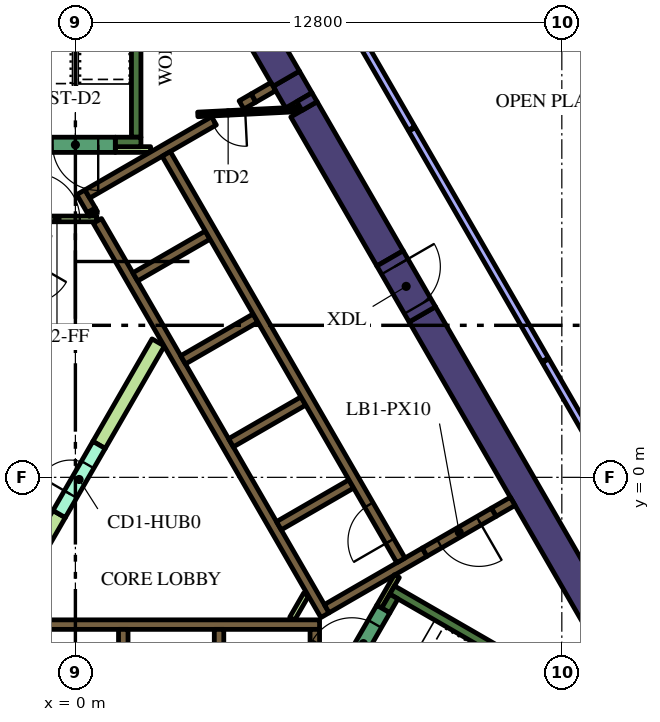
"""IFC4 building model, lengths in metres.
Left out: names, types, materials, properties, quantities, classifications, styles, units other than length and angle.
Written with IfcOpenShell. Run it as: python <this file> out.ifc"""

import sys

from ifc_helpers import new_model, si_unit, direction, frame, frame_2d, origin, place, context, subcontext, project, spatial, polyline, rectangle, outline, extrude, element, fill, save


model = new_model("IFC4")
c1 = context("Model", 3, precision=1e-05, world=origin(), true_north=direction((0.0, 1.0)))
c2 = subcontext(c1, "Body", "Model", "MODEL_VIEW")
j1 = project(units=[si_unit("LENGTHUNIT", "METRE"), si_unit("PLANEANGLEUNIT", "RADIAN")], contexts=[c1])
p1 = place(None, origin())
s1 = spatial("IfcSite", under=j1, at=p1, CompositionType="ELEMENT")
p2 = place(p1, origin())
s2 = spatial("IfcBuilding", under=s1, at=p2, CompositionType="ELEMENT")
p3 = place(p2, frame((0.0, 0.0, 179.4)))
s3 = spatial("IfcBuildingStorey", under=s2, at=p3, CompositionType="ELEMENT", Elevation=179.4)
p4 = place(p3, frame((9.129, 4.289, 0.0), z_axis=(0.0, 0.0, 1.0), x_axis=(0.499995742806, -0.866027861663, 0.0)))
e1 = element("IfcWall", 1, at=p4, inside=s3, PredefinedType="SOLIDWALL", context=c2, shape_type="SweptSolid", body=[
    extrude(rectangle(XDim=12.527, YDim=0.8, at=frame_2d((6.264, 0.0))), origin(), (0.0, 0.0, 1.0), 4.2),
])
p5 = place(p3, frame((5.878, 9.918, 0.0), z_axis=(0.0, 0.0, 1.0), x_axis=(-0.499893918903, 0.866086641072, 0.0)))
e2 = element("IfcWall", 2, at=p5, inside=s3, PredefinedType="SOLIDWALL", context=c2, shape_type="SweptSolid", body=[
    extrude(rectangle(XDim=0.657, YDim=0.8, at=frame_2d((0.329, 0.0))), origin(), (0.0, 0.0, 1.0), 4.2),
])
p6 = place(p3, frame((8.279, 5.761, 0.0), z_axis=(0.0, 0.0, 1.0), x_axis=(-0.500024261398, 0.866011396007, 0.0)))
e3 = element("IfcWall", 3, at=p6, inside=s3, PredefinedType="SOLIDWALL", context=c2, shape_type="SweptSolid", body=[
    extrude(rectangle(XDim=4.528, YDim=0.8, at=frame_2d((2.264, 0.0))), origin(), (0.0, 0.0, 1.0), 4.2),
])
p7 = place(p3, origin())
e4 = element("IfcWall", 4, at=p7, inside=s3, PredefinedType="SOLIDWALL", context=c2, shape_type="SweptSolid", body=[
    extrude(outline(polyline([(5.961, 9.654), (5.827, 9.886), (6.226, 10.116), (6.36, 9.884), (5.961, 9.654)])), origin(), (0.0, 0.0, 1.0), 4.2),
])
p8 = place(p3, frame((5.549, 10.489, 0.0), z_axis=(0.0, 0.0, 1.0), x_axis=(-0.50001746176, 0.866015321998, 0.0)))
e5 = element("IfcWall", 5, at=p8, inside=s3, PredefinedType="SOLIDWALL", context=c2, shape_type="SweptSolid", body=[
    extrude(rectangle(XDim=7.068, YDim=0.8, at=frame_2d((3.534, 0.0))), origin(), (0.0, 0.0, 1.0), 4.2),
])
p9 = place(p3, frame((8.334, -2.964, 0.0), z_axis=(0.0, 0.0, 1.0), x_axis=(0.866016039709, -0.500016218704, 0.0)))
e6 = element("IfcWall", 6, at=p9, inside=s3, PredefinedType="SOLIDWALL", context=c2, shape_type="SweptSolid", body=[
    extrude(rectangle(XDim=7.05, YDim=0.25, at=frame_2d((3.525, 0.0))), origin(), (0.0, 0.0, 1.0), 4.2),
])
p10 = place(p3, frame((8.168, -3.503, 0.0), z_axis=(0.0, 0.0, 1.0), x_axis=(0.49972245349, 0.866185586049, 0.0)))
e7 = element("IfcWall", 7, at=p10, inside=s3, PredefinedType="SOLIDWALL", context=c2, shape_type="SweptSolid", body=[
    extrude(rectangle(XDim=0.425, YDim=0.25, at=frame_2d((0.212, 0.0))), origin(), (0.0, 0.0, 1.0), 4.2),
])
p11 = place(p3, frame((1.6, 8.95, 0.0), z_axis=(0.0, 0.0, 1.0), x_axis=(0.0, 1.0, 0.0)))
e8 = element("IfcWall", 8, at=p11, inside=s3, PredefinedType="SOLIDWALL", context=c2, shape_type="SweptSolid", body=[
    extrude(rectangle(XDim=6.8, YDim=0.25, at=frame_2d((3.4, 0.0))), origin(), (0.0, 0.0, 1.0), 4.2),
])
p12 = place(p3, frame((1.05, 8.825, 0.0), z_axis=(0.0, 0.0, 1.0), x_axis=(1.0, 0.0, 0.0)))
e9 = element("IfcWall", 9, at=p12, inside=s3, PredefinedType="SOLIDWALL", context=c2, shape_type="SweptSolid", body=[
    extrude(rectangle(XDim=0.675, YDim=0.25, at=frame_2d((0.337, 0.0))), origin(), (0.0, 0.0, 1.0), 4.2),
])
p13 = place(p3, frame((-5.545, -3.875, 0.0), z_axis=(0.0, 0.0, 1.0), x_axis=(1.0, 0.0, 0.0)))
e10 = element("IfcWall", 10, at=p13, inside=s3, PredefinedType="SOLIDWALL", context=c2, shape_type="SweptSolid", body=[
    extrude(rectangle(XDim=11.97, YDim=0.25, at=frame_2d((5.985, 0.0))), origin(), (0.0, 0.0, 1.0), 4.2),
])
p14 = place(p3, frame((6.3, -7.24, 0.0), z_axis=(0.0, 0.0, 1.0), x_axis=(0.0, 1.0, 0.0)))
e11 = element("IfcWall", 11, at=p14, inside=s3, PredefinedType="SOLIDWALL", context=c2, shape_type="SweptSolid", body=[
    extrude(rectangle(XDim=3.24, YDim=0.25, at=frame_2d((1.62, 0.0))), origin(), (0.0, 0.0, 1.0), 4.2),
])
for number, where, z_axis, x_axis in (
    (12, (3.78, -4.0, 0.0), (0.0, 0.0, 1.0), (0.0, -1.0, 0.0)),
    (13, (1.26, -4.0, 0.0), (0.0, 0.0, 1.0), (0.0, -1.0, 0.0)),
):
    element("IfcWall", number, at=place(p3, frame(where, z_axis=z_axis, x_axis=x_axis)), inside=s3, PredefinedType="SOLIDWALL", context=c2, shape_type="SweptSolid", body=[
        extrude(rectangle(XDim=2.2, YDim=0.25, at=frame_2d((1.1, 0.0))), origin(), (0.0, 0.0, 1.0), 4.2),
    ])
p15 = place(p3, frame((11.507, -0.631, 0.0), z_axis=(0.0, 0.0, 1.0), x_axis=(-0.866093731455, -0.499881634324, 0.0)))
e14 = element("IfcWall", 14, at=p15, inside=s3, PredefinedType="SOLIDWALL", context=c2, shape_type="SweptSolid", body=[
    extrude(rectangle(XDim=0.575, YDim=0.25, at=frame_2d((0.288, 0.0))), origin(), (0.0, 0.0, 1.0), 4.2),
])
p16 = place(p3, frame((0.473, 6.93, 0.0), z_axis=(0.0, 0.0, 1.0), x_axis=(-0.49972245349, 0.866185586049, 0.0)))
e15 = element("IfcWall", 15, at=p16, inside=s3, PredefinedType="SOLIDWALL", context=c2, shape_type="SweptSolid", body=[
    extrude(rectangle(XDim=0.11, YDim=0.25, at=frame_2d((0.055, 0.0))), origin(), (0.0, 0.0, 1.0), 4.2),
])
p17 = place(p3, frame((6.568, -3.627, 0.0), z_axis=(0.0, 0.0, 1.0), x_axis=(-0.499999455981, 0.866025717874, 0.0)))
e16 = element("IfcWall", 16, at=p17, inside=s3, PredefinedType="SOLIDWALL", context=c2, shape_type="SweptSolid", body=[
    extrude(rectangle(XDim=11.978, YDim=0.25, at=frame_2d((5.989, 0.0))), origin(), (0.0, 0.0, 1.0), 4.2),
])
p18 = place(p3, frame((0.417, 7.027, 0.0), z_axis=(0.0, 0.0, 1.0), x_axis=(-0.500210807569, 0.865903659763, 0.0)))
e17 = element("IfcWall", 17, at=p18, inside=s3, PredefinedType="SOLIDWALL", context=c2, shape_type="SweptSolid", body=[
    extrude(rectangle(XDim=0.548, YDim=0.25, at=frame_2d((0.274, 0.0))), origin(), (0.0, 0.0, 1.0), 4.2),
])
p19 = place(p3, frame((3.647, 9.38, 0.0), z_axis=(0.0, 0.0, 1.0), x_axis=(-0.866025015791, -0.500000672024, 0.0)))
e18 = element("IfcWall", 18, at=p19, inside=s3, PredefinedType="SOLIDWALL", context=c2, shape_type="SweptSolid", body=[
    extrude(rectangle(XDim=3.849, YDim=0.25, at=frame_2d((1.924, 0.0))), origin(), (0.0, 0.0, 1.0), 4.2),
])
p20 = place(p3, frame((1.574, 5.274, 0.0), z_axis=(0.0, 0.0, 1.0), x_axis=(0.866028486751, 0.499994660107, 0.0)))
e19 = element("IfcWall", 19, at=p20, inside=s3, PredefinedType="SOLIDWALL", context=c2, shape_type="SweptSolid", body=[
    extrude(rectangle(XDim=2.2, YDim=0.25, at=frame_2d((1.1, 0.0))), origin(), (0.0, 0.0, 1.0), 4.2),
])
for number, where, z_axis, x_axis in (
    (20, (2.834, 3.091, 0.0), (0.0, 0.0, 1.0), (0.866, 0.5, 0.0)),
    (21, (4.094, 0.909, 0.0), (0.0, 0.0, 1.0), (0.866, 0.5, 0.0)),
    (22, (5.354, -1.274, 0.0), (0.0, 0.0, 1.0), (0.866, 0.5, 0.0)),
):
    element("IfcWall", number, at=place(p3, frame(where, z_axis=z_axis, x_axis=x_axis)), inside=s3, PredefinedType="SOLIDWALL", context=c2, shape_type="SweptSolid", body=[
        extrude(rectangle(XDim=2.2, YDim=0.25, at=frame_2d((1.1, 0.0))), origin(), (0.0, 0.0, 1.0), 4.2),
    ])
p21 = place(p3, frame((6.614, -3.456, 0.0), z_axis=(0.0, 0.0, 1.0), x_axis=(0.866032512851, 0.499987686533, 0.0)))
e23 = element("IfcWall", 23, at=p21, inside=s3, PredefinedType="SOLIDWALL", context=c2, shape_type="SweptSolid", body=[
    extrude(rectangle(XDim=2.975, YDim=0.25, at=frame_2d((1.487, 0.0))), origin(), (0.0, 0.0, 1.0), 4.2),
])
p22 = place(p3, frame((4.688, 9.981, 0.0), z_axis=(0.0, 0.0, 1.0), x_axis=(-0.865974312977, -0.500088481434, 0.0)))
e24 = element("IfcWall", 24, at=p22, inside=s3, PredefinedType="SOLIDWALL", context=c2, shape_type="SweptSolid", body=[
    extrude(rectangle(XDim=0.366, YDim=0.25, at=frame_2d((0.183, 0.0))), origin(), (0.0, 0.0, 1.0), 4.2),
])
p23 = place(p3, frame((4.689, 9.982, 0.0), z_axis=(0.0, 0.0, 1.0), x_axis=(0.865947592822, 0.500134748329, 0.0)))
e25 = element("IfcWall", 25, at=p23, inside=s3, PredefinedType="SOLIDWALL", context=c2, shape_type="SweptSolid", body=[
    extrude(rectangle(XDim=0.598, YDim=0.25, at=frame_2d((0.299, 0.0))), origin(), (0.0, 0.0, 1.0), 4.2),
])
p24 = place(p3, frame((1.05, 8.625, 0.0), z_axis=(0.0, 0.0, 1.0), x_axis=(1.0, 0.0, 0.0)))
e26 = element("IfcWall", 26, at=p24, inside=s3, PredefinedType="PARTITIONING", context=c2, shape_type="SweptSolid", body=[
    extrude(rectangle(XDim=0.929, YDim=0.15, at=frame_2d((0.464, 0.0))), origin(), (0.0, 0.0, 1.0), 3.15),
])
p25 = place(p3, frame((8.459, -2.599, 0.0), z_axis=(0.0, 0.0, 1.0), x_axis=(-0.500041054325, -0.866001699761, 0.0)))
e27 = element("IfcWall", 27, at=p25, inside=s3, PredefinedType="PARTITIONING", context=c2, shape_type="SweptSolid", body=[
    extrude(rectangle(XDim=0.929, YDim=0.15, at=frame_2d((0.464, 0.0))), origin(), (0.0, 0.0, 1.0), 4.2),
])
p26 = place(p3, frame((5.705, -3.718, 0.0), z_axis=(0.0, 0.0, 1.0), x_axis=(0.499962090823, 0.866047289552, 0.0)))
e28 = element("IfcWall", 28, at=p26, inside=s3, PredefinedType="PARTITIONING", context=c2, shape_type="SweptSolid", body=[
    extrude(rectangle(XDim=0.735, YDim=0.15, at=frame_2d((0.367, 0.0))), origin(), (0.0, 0.0, 1.0), 3.15),
])
e29 = element("IfcWall", 29, at=p7, inside=s3, PredefinedType="PARTITIONING", context=c2, shape_type="SweptSolid", body=[
    extrude(outline(polyline([(2.017, 3.643), (2.342, 3.456), (0.785, 0.76), (0.46, 0.947), (2.017, 3.643)])), origin(), (0.0, 0.0, 1.0), 3.15),
])
e30 = element("IfcWall", 30, at=p7, inside=s3, PredefinedType="PARTITIONING", context=c2, shape_type="SweptSolid", body=[
    extrude(outline(polyline([(-0.59, -0.872), (-0.265, -1.059), (-1.822, -3.756), (-2.147, -3.568), (-0.59, -0.872)])), origin(), (0.0, 0.0, 1.0), 3.15),
])
p27 = place(p3, frame((8.565, -2.185, 0.0), z_axis=(0.0, 0.0, 1.0), x_axis=(-0.499997954832, 0.866026584559, 0.0)))
e31 = element("IfcWall", 31, at=p27, inside=s3, PredefinedType="SOLIDWALL", context=c2, shape_type="SweptSolid", body=[
    extrude(rectangle(XDim=12.35, YDim=0.25, at=frame_2d((6.175, 0.0))), origin(), (0.0, 0.0, 1.0), 4.2),
])
p28 = place(p27, frame((0.585, 0.0, 0.0)))
e32 = element("IfcOpeningElement", 32, at=p28, cuts=e31, PredefinedType="OPENING", context=c2, shape_type="SweptSolid", body=[
    extrude(rectangle(XDim=1.1, YDim=2.1, at=frame_2d((0.55, 1.05))), frame((0.0, 0.135, 0.0), z_axis=(0.0, -1.0, 0.0), x_axis=(1.0, 0.0, 0.0)), (0.0, 0.0, 1.0), 0.27),
])
p29 = place(p3, frame((7.053, -5.284, 0.0), z_axis=(0.0, 0.0, 1.0), x_axis=(0.500078061341, 0.865980330357, 0.0)))
e33 = element("IfcWall", 33, at=p29, inside=s3, PredefinedType="SOLIDWALL", context=c2, shape_type="SweptSolid", body=[
    extrude(rectangle(XDim=2.1, YDim=0.4, at=frame_2d((1.05, 0.0))), origin(), (0.0, 0.0, 1.0), 4.2),
])
p30 = place(p29, frame((0.45, 0.0, 0.0)))
e34 = element("IfcOpeningElement", 34, at=p30, cuts=e33, PredefinedType="OPENING", context=c2, shape_type="SweptSolid", body=[
    extrude(rectangle(XDim=1.2, YDim=2.1, at=frame_2d((0.6, 1.05))), frame((0.0, 0.21, 0.0), z_axis=(0.0, -1.0, 0.0), x_axis=(1.0, 0.0, 0.0)), (0.0, 0.0, 1.0), 0.42),
])
p31 = place(p3, frame((1.05, 8.75, 0.0), z_axis=(0.0, 0.0, 1.0), x_axis=(-1.0, 0.0, 0.0)))
e35 = element("IfcWall", 35, at=p31, inside=s3, PredefinedType="SOLIDWALL", context=c2, shape_type="SweptSolid", body=[
    extrude(rectangle(XDim=2.1, YDim=0.4, at=frame_2d((1.05, 0.0))), origin(), (0.0, 0.0, 1.0), 4.2),
])
p32 = place(p31, frame((0.45, 0.0, 0.0)))
e36 = element("IfcOpeningElement", 36, at=p32, cuts=e35, PredefinedType="OPENING", context=c2, shape_type="SweptSolid", body=[
    extrude(rectangle(XDim=1.2, YDim=2.1, at=frame_2d((0.6, 1.05))), frame((0.0, 0.21, 0.0), z_axis=(0.0, -1.0, 0.0), x_axis=(1.0, 0.0, 0.0)), (0.0, 0.0, 1.0), 0.42),
])
p33 = place(p3, frame((5.917, 9.684, 0.0), z_axis=(0.0, 0.0, 1.0), x_axis=(-0.998758194515, -0.049820366212, 0.0)))
e37 = element("IfcWall", 37, at=p33, inside=s3, PredefinedType="PARTITIONING", context=c2, shape_type="SweptSolid", body=[
    extrude(rectangle(XDim=2.7, YDim=0.12, at=frame_2d((1.35, 0.0))), origin(), (0.0, 0.0, 1.0), 3.15),
])
p34 = place(p33, frame((1.45, 0.0, 0.0)))
e38 = element("IfcOpeningElement", 38, at=p34, cuts=e37, PredefinedType="OPENING", context=c2, shape_type="SweptSolid", body=[
    extrude(rectangle(XDim=0.9, YDim=2.1, at=frame_2d((0.45, 1.05))), frame((0.0, 0.07, 0.0), z_axis=(0.0, -1.0, 0.0), x_axis=(1.0, 0.0, 0.0)), (0.0, 0.0, 1.0), 0.14),
])
p35 = place(p3, frame((-0.427, -0.966, 0.0), z_axis=(0.0, 0.0, 1.0), x_axis=(0.49994051562, 0.866059744384, 0.0)))
e39 = element("IfcWall", 39, at=p35, inside=s3, PredefinedType="PARTITIONING", context=c2, shape_type="SweptSolid", body=[
    extrude(rectangle(XDim=2.1, YDim=0.375, at=frame_2d((1.05, 0.0))), origin(), (0.0, 0.0, 1.0), 3.15),
])
p36 = place(p35, frame((0.6, 0.0, 0.0)))
e40 = element("IfcOpeningElement", 40, at=p36, cuts=e39, PredefinedType="OPENING", context=c2, shape_type="SweptSolid", body=[
    extrude(rectangle(XDim=0.9, YDim=2.1, at=frame_2d((0.45, 1.05))), frame((0.0, 0.198, 0.0), z_axis=(0.0, -1.0, 0.0), x_axis=(1.0, 0.0, 0.0)), (0.0, 0.0, 1.0), 0.395),
])
p37 = place(p3, frame((-1.534, 6.8, 0.0), z_axis=(0.0, 0.0, 1.0), x_axis=(1.0, 0.0, 0.0)))
e41 = element("IfcWall", 41, at=p37, inside=s3, PredefinedType="PARTITIONING", context=c2, shape_type="SweptSolid", body=[
    extrude(rectangle(XDim=2.1, YDim=0.15, at=frame_2d((1.05, 0.0))), origin(), (0.0, 0.0, 1.0), 3.15),
])
p38 = place(p37, frame((0.45, 0.0, 0.0)))
e42 = element("IfcOpeningElement", 42, at=p38, cuts=e41, PredefinedType="OPENING", context=c2, shape_type="SweptSolid", body=[
    extrude(rectangle(XDim=1.2, YDim=2.1, at=frame_2d((0.6, 1.05))), frame((0.0, 0.085, 0.0), z_axis=(0.0, -1.0, 0.0), x_axis=(1.0, 0.0, 0.0)), (0.0, 0.0, 1.0), 0.17),
])
p39 = place(p3, frame((11.009, -0.919, 0.0), z_axis=(0.0, 0.0, 1.0), x_axis=(-0.866059744384, -0.49994051562, 0.0)))
e43 = element("IfcWall", 43, at=p39, inside=s3, PredefinedType="SOLIDWALL", context=c2, shape_type="SweptSolid", body=[
    extrude(rectangle(XDim=2.1, YDim=0.25, at=frame_2d((1.05, 0.0))), origin(), (0.0, 0.0, 1.0), 4.2),
])
p40 = place(p39, frame((0.45, 0.0, 0.0)))
e44 = element("IfcOpeningElement", 44, at=p40, cuts=e43, PredefinedType="OPENING", context=c2, shape_type="SweptSolid", body=[
    extrude(rectangle(XDim=1.2, YDim=2.1, at=frame_2d((0.6, 1.05))), frame((0.0, 0.135, 0.0), z_axis=(0.0, -1.0, 0.0), x_axis=(1.0, 0.0, 0.0)), (0.0, 0.0, 1.0), 0.27),
])
p41 = place(p3, frame((8.279, 5.761, 0.0), z_axis=(0.0, 0.0, 1.0), x_axis=(0.500062241894, -0.865989465428, 0.0)))
e45 = element("IfcWall", 45, at=p41, inside=s3, PredefinedType="SOLIDWALL", context=c2, shape_type="SweptSolid", body=[
    extrude(rectangle(XDim=1.7, YDim=0.8, at=frame_2d((0.85, 0.0))), origin(), (0.0, 0.0, 1.0), 4.2),
])
p42 = place(p41, frame((0.25, 0.0, 0.0)))
e46 = element("IfcOpeningElement", 46, at=p42, cuts=e45, PredefinedType="OPENING", context=c2, shape_type="SweptSolid", body=[
    extrude(rectangle(XDim=1.2, YDim=2.1, at=frame_2d((0.6, 1.05))), frame((0.0, 0.41, 0.0), z_axis=(0.0, -1.0, 0.0), x_axis=(1.0, 0.0, 0.0)), (0.0, 0.0, 1.0), 0.82),
])
p43 = place(p3, frame((12.359, 3.094, 0.0), z_axis=(0.0, 0.0, 1.0), x_axis=(-0.500010275428, 0.866019471182, 0.0)))
e47 = element("IfcWall", 47, at=p43, inside=s3, PredefinedType="PARTITIONING", context=c2, shape_type="SweptSolid", body=[
    extrude(rectangle(XDim=7.0, YDim=0.2, at=frame_2d((3.5, 0.0))), origin(), (0.0, 0.0, 1.0), 3.15),
])
p44 = place(p3, frame((8.844, 9.182, 0.0), z_axis=(0.0, 0.0, 1.0), x_axis=(-0.50000000053, 0.866025403479, 0.0)))
e48 = element("IfcWall", 48, at=p44, inside=s3, PredefinedType="PARTITIONING", context=c2, shape_type="SweptSolid", body=[
    extrude(rectangle(XDim=9.188, YDim=0.2, at=frame_2d((4.594, 0.0))), origin(), (0.0, 0.0, 1.0), 3.15),
])
p45 = place(p44, frame((4.1, 0.0, 0.0)))
e49 = element("IfcOpeningElement", 49, at=p45, cuts=e48, PredefinedType="OPENING", context=c2, shape_type="SweptSolid", body=[
    extrude(rectangle(XDim=1.0, YDim=2.1, at=frame_2d((0.5, 1.05))), frame((0.0, 0.11, 0.0), z_axis=(0.0, -1.0, 0.0), x_axis=(1.0, 0.0, 0.0)), (0.0, 0.0, 1.0), 0.22),
])
p46 = place(p3, frame((13.765, 0.659, 0.0), z_axis=(0.0, 0.0, 1.0), x_axis=(-0.500046568876, 0.865998515562, 0.0)))
e50 = element("IfcWall", 50, at=p46, inside=s3, PredefinedType="PARTITIONING", context=c2, shape_type="SweptSolid", body=[
    extrude(rectangle(XDim=2.782, YDim=0.2, at=frame_2d((1.391, 0.0))), origin(), (0.0, 0.0, 1.0), 3.15),
])
p47 = place(p28, origin())
e51 = element("IfcDoor", 51, at=p47, inside=s3, OperationType="DOUBLE_DOOR_SLIDING", PredefinedType="DOOR", context=c2, shape_type="SweptSolid", body=[
    extrude(rectangle(XDim=1.1, YDim=2.1, at=frame_2d((0.55, 1.05))), frame((0.0, 0.025, 0.0), z_axis=(0.0, -1.0, 0.0), x_axis=(1.0, 0.0, 0.0)), (0.0, 0.0, 1.0), 0.05),
])
fill(e32, e51)
p48 = place(p30, origin())
e52 = element("IfcDoor", 52, at=p48, inside=s3, OperationType="SINGLE_SWING_LEFT", PredefinedType="DOOR", context=c2, shape_type="SweptSolid", body=[
    extrude(rectangle(XDim=1.2, YDim=2.1, at=frame_2d((0.6, 1.05))), frame((0.0, 0.025, 0.0), z_axis=(0.0, -1.0, 0.0), x_axis=(1.0, 0.0, 0.0)), (0.0, 0.0, 1.0), 0.05),
])
fill(e34, e52)
p49 = place(p32, origin())
e53 = element("IfcDoor", 53, at=p49, inside=s3, OperationType="SINGLE_SWING_LEFT", PredefinedType="DOOR", context=c2, shape_type="SweptSolid", body=[
    extrude(rectangle(XDim=1.2, YDim=2.1, at=frame_2d((0.6, 1.05))), frame((0.0, 0.025, 0.0), z_axis=(0.0, -1.0, 0.0), x_axis=(1.0, 0.0, 0.0)), (0.0, 0.0, 1.0), 0.05),
])
fill(e36, e53)
p50 = place(p34, origin())
e54 = element("IfcDoor", 54, at=p50, inside=s3, OperationType="SINGLE_SWING_LEFT", PredefinedType="DOOR", context=c2, shape_type="SweptSolid", body=[
    extrude(rectangle(XDim=0.9, YDim=2.1, at=frame_2d((0.45, 1.05))), frame((0.0, 0.025, 0.0), z_axis=(0.0, -1.0, 0.0), x_axis=(1.0, 0.0, 0.0)), (0.0, 0.0, 1.0), 0.05),
])
fill(e38, e54)
p51 = place(p36, origin())
e55 = element("IfcDoor", 55, at=p51, inside=s3, OperationType="SINGLE_SWING_LEFT", PredefinedType="DOOR", context=c2, shape_type="SweptSolid", body=[
    extrude(rectangle(XDim=0.9, YDim=2.1, at=frame_2d((0.45, 1.05))), frame((0.0, 0.025, 0.0), z_axis=(0.0, -1.0, 0.0), x_axis=(1.0, 0.0, 0.0)), (0.0, 0.0, 1.0), 0.05),
])
fill(e40, e55)
p52 = place(p38, origin())
e56 = element("IfcDoor", 56, at=p52, inside=s3, OperationType="SINGLE_SWING_LEFT", PredefinedType="DOOR", context=c2, shape_type="SweptSolid", body=[
    extrude(rectangle(XDim=1.2, YDim=2.1, at=frame_2d((0.6, 1.05))), frame((0.0, 0.025, 0.0), z_axis=(0.0, -1.0, 0.0), x_axis=(1.0, 0.0, 0.0)), (0.0, 0.0, 1.0), 0.05),
])
fill(e42, e56)
p53 = place(p40, origin())
e57 = element("IfcDoor", 57, at=p53, inside=s3, OperationType="SINGLE_SWING_LEFT", PredefinedType="DOOR", context=c2, shape_type="SweptSolid", body=[
    extrude(rectangle(XDim=1.2, YDim=2.1, at=frame_2d((0.6, 1.05))), frame((0.0, 0.025, 0.0), z_axis=(0.0, -1.0, 0.0), x_axis=(1.0, 0.0, 0.0)), (0.0, 0.0, 1.0), 0.05),
])
fill(e44, e57)
p54 = place(p42, origin())
e58 = element("IfcDoor", 58, at=p54, inside=s3, OperationType="SINGLE_SWING_LEFT", PredefinedType="DOOR", context=c2, shape_type="SweptSolid", body=[
    extrude(rectangle(XDim=1.2, YDim=2.1, at=frame_2d((0.6, 1.05))), frame((0.0, 0.025, 0.0), z_axis=(0.0, -1.0, 0.0), x_axis=(1.0, 0.0, 0.0)), (0.0, 0.0, 1.0), 0.05),
])
fill(e46, e58)
save(model, sys.argv[1])
